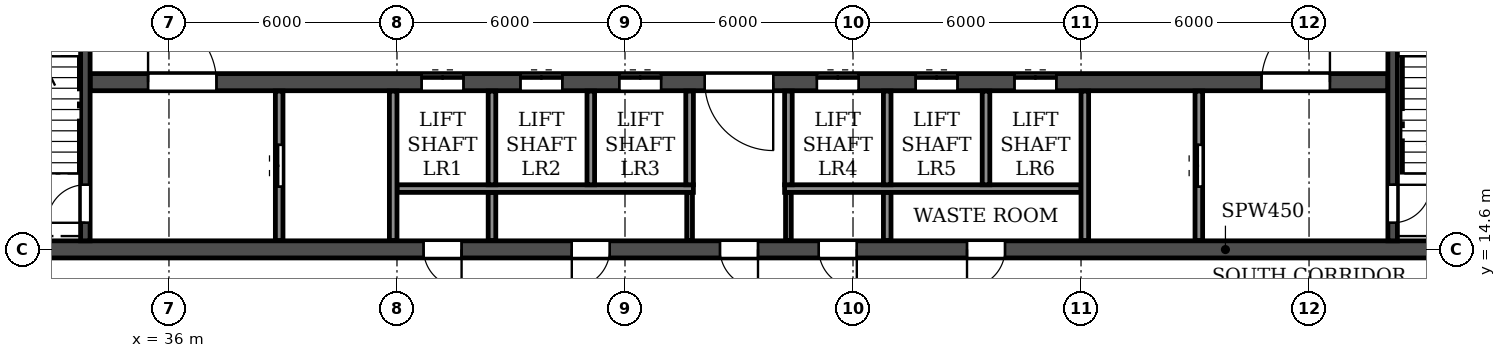
"""IFC4 building model, lengths in metres.
Left out: names, types, materials, properties, quantities, classifications, styles, units other than length and angle.
Written with IfcOpenShell. Run it as: python <this file> out.ifc"""

import sys

from ifc_helpers import new_model, si_unit, direction, frame, frame_2d, origin, place, context, subcontext, project, spatial, rectangle, extrude, element, fill, save


model = new_model("IFC4")
c1 = context("Model", 3, precision=1e-05, world=origin(), true_north=direction((0.0, 1.0)))
c2 = subcontext(c1, "Body", "Model", "MODEL_VIEW")
j1 = project(units=[si_unit("LENGTHUNIT", "METRE"), si_unit("PLANEANGLEUNIT", "RADIAN")], contexts=[c1])
p1 = place(None, origin())
s1 = spatial("IfcSite", under=j1, at=p1, CompositionType="ELEMENT")
p2 = place(p1, origin())
s2 = spatial("IfcBuilding", under=s1, at=p2, CompositionType="ELEMENT")
p3 = place(p2, frame((0.0, 0.0, 10.8)))
s3 = spatial("IfcBuildingStorey", under=s2, at=p3, CompositionType="ELEMENT", Elevation=10.8)
p4 = place(p3, frame((18.0, 14.6, 0.0), z_axis=(0.0, 0.0, 1.0), x_axis=(1.0, 0.0, 0.0)))
e1 = element("IfcWall", 1, at=p4, inside=s3, PredefinedType="SOLIDWALL", context=c2, shape_type="SweptSolid", body=[
    extrude(rectangle(XDim=66.0, YDim=0.45, at=frame_2d((33.0, 0.0))), origin(), (0.0, 0.0, 1.0), 3.92),
])
p5 = place(p4, frame((0.9, 0.0, 0.0)))
e2 = element("IfcOpeningElement", 2, at=p5, cuts=e1, PredefinedType="OPENING", context=c2, shape_type="SweptSolid", body=[
    extrude(rectangle(XDim=1.0, YDim=2.1, at=frame_2d((0.5, 1.05))), frame((0.0, 0.235, 0.0), z_axis=(0.0, -1.0, 0.0), x_axis=(1.0, 0.0, 0.0)), (0.0, 0.0, 1.0), 0.47),
])
p6 = place(p4, frame((8.8, 0.0, 0.0)))
e3 = element("IfcOpeningElement", 3, at=p6, cuts=e1, PredefinedType="OPENING", context=c2, shape_type="SweptSolid", body=[
    extrude(rectangle(XDim=1.0, YDim=2.1, at=frame_2d((0.5, 1.05))), frame((0.0, 0.235, 0.0), z_axis=(0.0, -1.0, 0.0), x_axis=(1.0, 0.0, 0.0)), (0.0, 0.0, 1.0), 0.47),
])
p7 = place(p4, frame((13.4, 0.0, 0.0)))
e4 = element("IfcOpeningElement", 4, at=p7, cuts=e1, PredefinedType="OPENING", context=c2, shape_type="SweptSolid", body=[
    extrude(rectangle(XDim=1.0, YDim=2.1, at=frame_2d((0.5, 1.05))), frame((0.0, 0.235, 0.0), z_axis=(0.0, -1.0, 0.0), x_axis=(1.0, 0.0, 0.0)), (0.0, 0.0, 1.0), 0.47),
])
p8 = place(p4, frame((24.7, 0.0, 0.0)))
e5 = element("IfcOpeningElement", 5, at=p8, cuts=e1, PredefinedType="OPENING", context=c2, shape_type="SweptSolid", body=[
    extrude(rectangle(XDim=1.0, YDim=2.1, at=frame_2d((0.5, 1.05))), frame((0.0, 0.235, 0.0), z_axis=(0.0, -1.0, 0.0), x_axis=(1.0, 0.0, 0.0)), (0.0, 0.0, 1.0), 0.47),
])
p9 = place(p4, frame((28.6, 0.0, 0.0)))
e6 = element("IfcOpeningElement", 6, at=p9, cuts=e1, PredefinedType="OPENING", context=c2, shape_type="SweptSolid", body=[
    extrude(rectangle(XDim=1.0, YDim=2.1, at=frame_2d((0.5, 1.05))), frame((0.0, 0.235, 0.0), z_axis=(0.0, -1.0, 0.0), x_axis=(1.0, 0.0, 0.0)), (0.0, 0.0, 1.0), 0.47),
])
p10 = place(p4, frame((32.5, 0.0, 0.0)))
e7 = element("IfcOpeningElement", 7, at=p10, cuts=e1, PredefinedType="OPENING", context=c2, shape_type="SweptSolid", body=[
    extrude(rectangle(XDim=1.0, YDim=2.1, at=frame_2d((0.5, 1.05))), frame((0.0, 0.235, 0.0), z_axis=(0.0, -1.0, 0.0), x_axis=(1.0, 0.0, 0.0)), (0.0, 0.0, 1.0), 0.47),
])
p11 = place(p4, frame((35.1, 0.0, 0.0)))
e8 = element("IfcOpeningElement", 8, at=p11, cuts=e1, PredefinedType="OPENING", context=c2, shape_type="SweptSolid", body=[
    extrude(rectangle(XDim=1.0, YDim=2.1, at=frame_2d((0.5, 1.05))), frame((0.0, 0.235, 0.0), z_axis=(0.0, -1.0, 0.0), x_axis=(1.0, 0.0, 0.0)), (0.0, 0.0, 1.0), 0.47),
])
p12 = place(p4, frame((39.0, 0.0, 0.0)))
e9 = element("IfcOpeningElement", 9, at=p12, cuts=e1, PredefinedType="OPENING", context=c2, shape_type="SweptSolid", body=[
    extrude(rectangle(XDim=1.0, YDim=2.1, at=frame_2d((0.5, 1.05))), frame((0.0, 0.235, 0.0), z_axis=(0.0, -1.0, 0.0), x_axis=(1.0, 0.0, 0.0)), (0.0, 0.0, 1.0), 0.47),
])
p13 = place(p4, frame((51.6, 0.0, 0.0)))
e10 = element("IfcOpeningElement", 10, at=p13, cuts=e1, PredefinedType="OPENING", context=c2, shape_type="SweptSolid", body=[
    extrude(rectangle(XDim=1.0, YDim=2.1, at=frame_2d((0.5, 1.05))), frame((0.0, 0.235, 0.0), z_axis=(0.0, -1.0, 0.0), x_axis=(1.0, 0.0, 0.0)), (0.0, 0.0, 1.0), 0.47),
])
p14 = place(p4, frame((56.25, 0.0, 0.0)))
e11 = element("IfcOpeningElement", 11, at=p14, cuts=e1, PredefinedType="OPENING", context=c2, shape_type="SweptSolid", body=[
    extrude(rectangle(XDim=0.9, YDim=2.1, at=frame_2d((0.45, 1.05))), frame((0.0, 0.235, 0.0), z_axis=(0.0, -1.0, 0.0), x_axis=(1.0, 0.0, 0.0)), (0.0, 0.0, 1.0), 0.47),
])
p15 = place(p4, frame((64.1, 0.0, 0.0)))
e12 = element("IfcOpeningElement", 12, at=p15, cuts=e1, PredefinedType="OPENING", context=c2, shape_type="SweptSolid", body=[
    extrude(rectangle(XDim=1.0, YDim=2.1, at=frame_2d((0.5, 1.05))), frame((0.0, 0.235, 0.0), z_axis=(0.0, -1.0, 0.0), x_axis=(1.0, 0.0, 0.0)), (0.0, 0.0, 1.0), 0.47),
])
p16 = place(p3, frame((33.925, 19.0, 0.0), z_axis=(0.0, 0.0, 1.0), x_axis=(1.0, 0.0, 0.0)))
e13 = element("IfcWall", 13, at=p16, inside=s3, PredefinedType="SOLIDWALL", context=c2, shape_type="SweptSolid", body=[
    extrude(rectangle(XDim=34.15, YDim=0.45, at=frame_2d((17.075, 0.0))), origin(), (0.0, 0.0, 1.0), 3.92),
])
p17 = place(p16, frame((16.175, 0.0, 0.0)))
e14 = element("IfcOpeningElement", 14, at=p17, cuts=e13, PredefinedType="OPENING", context=c2, shape_type="SweptSolid", body=[
    extrude(rectangle(XDim=1.8, YDim=2.1, at=frame_2d((0.9, 1.05))), frame((0.0, 0.235, 0.0), z_axis=(0.0, -1.0, 0.0), x_axis=(1.0, 0.0, 0.0)), (0.0, 0.0, 1.0), 0.47),
])
p18 = place(p16, frame((1.525, 0.0, 0.0)))
e15 = element("IfcOpeningElement", 15, at=p18, cuts=e13, PredefinedType="OPENING", context=c2, shape_type="SweptSolid", body=[
    extrude(rectangle(XDim=1.8, YDim=2.1, at=frame_2d((0.9, 1.05))), frame((0.0, 0.235, 0.0), z_axis=(0.0, -1.0, 0.0), x_axis=(1.0, 0.0, 0.0)), (0.0, 0.0, 1.0), 0.47),
])
p19 = place(p16, frame((8.725, 0.0, 0.0)))
e16 = element("IfcOpeningElement", 16, at=p19, cuts=e13, PredefinedType="OPENING", context=c2, shape_type="SweptSolid", body=[
    extrude(rectangle(XDim=1.1, YDim=2.1, at=frame_2d((0.55, 1.05))), frame((0.0, 0.235, 0.0), z_axis=(0.0, -1.0, 0.0), x_axis=(1.0, 0.0, 0.0)), (0.0, 0.0, 1.0), 0.47),
])
p20 = place(p16, frame((11.325, 0.0, 0.0)))
e17 = element("IfcOpeningElement", 17, at=p20, cuts=e13, PredefinedType="OPENING", context=c2, shape_type="SweptSolid", body=[
    extrude(rectangle(XDim=1.1, YDim=2.1, at=frame_2d((0.55, 1.05))), frame((0.0, 0.235, 0.0), z_axis=(0.0, -1.0, 0.0), x_axis=(1.0, 0.0, 0.0)), (0.0, 0.0, 1.0), 0.47),
])
p21 = place(p16, frame((13.925, 0.0, 0.0)))
e18 = element("IfcOpeningElement", 18, at=p21, cuts=e13, PredefinedType="OPENING", context=c2, shape_type="SweptSolid", body=[
    extrude(rectangle(XDim=1.1, YDim=2.1, at=frame_2d((0.55, 1.05))), frame((0.0, 0.235, 0.0), z_axis=(0.0, -1.0, 0.0), x_axis=(1.0, 0.0, 0.0)), (0.0, 0.0, 1.0), 0.47),
])
p22 = place(p16, frame((19.125, 0.0, 0.0)))
e19 = element("IfcOpeningElement", 19, at=p22, cuts=e13, PredefinedType="OPENING", context=c2, shape_type="SweptSolid", body=[
    extrude(rectangle(XDim=1.1, YDim=2.1, at=frame_2d((0.55, 1.05))), frame((0.0, 0.235, 0.0), z_axis=(0.0, -1.0, 0.0), x_axis=(1.0, 0.0, 0.0)), (0.0, 0.0, 1.0), 0.47),
])
p23 = place(p16, frame((21.725, 0.0, 0.0)))
e20 = element("IfcOpeningElement", 20, at=p23, cuts=e13, PredefinedType="OPENING", context=c2, shape_type="SweptSolid", body=[
    extrude(rectangle(XDim=1.1, YDim=2.1, at=frame_2d((0.55, 1.05))), frame((0.0, 0.235, 0.0), z_axis=(0.0, -1.0, 0.0), x_axis=(1.0, 0.0, 0.0)), (0.0, 0.0, 1.0), 0.47),
])
p24 = place(p16, frame((24.325, 0.0, 0.0)))
e21 = element("IfcOpeningElement", 21, at=p24, cuts=e13, PredefinedType="OPENING", context=c2, shape_type="SweptSolid", body=[
    extrude(rectangle(XDim=1.1, YDim=2.1, at=frame_2d((0.55, 1.05))), frame((0.0, 0.235, 0.0), z_axis=(0.0, -1.0, 0.0), x_axis=(1.0, 0.0, 0.0)), (0.0, 0.0, 1.0), 0.47),
])
p25 = place(p16, frame((30.825, 0.0, 0.0)))
e22 = element("IfcOpeningElement", 22, at=p25, cuts=e13, PredefinedType="OPENING", context=c2, shape_type="SweptSolid", body=[
    extrude(rectangle(XDim=1.8, YDim=2.1, at=frame_2d((0.9, 1.05))), frame((0.0, 0.235, 0.0), z_axis=(0.0, -1.0, 0.0), x_axis=(1.0, 0.0, 0.0)), (0.0, 0.0, 1.0), 0.47),
])
p26 = place(p3, frame((33.8, 14.825, 0.0), z_axis=(0.0, 0.0, 1.0), x_axis=(0.0, 1.0, 0.0)))
e23 = element("IfcWall", 23, at=p26, inside=s3, PredefinedType="SOLIDWALL", context=c2, shape_type="SweptSolid", body=[
    extrude(rectangle(XDim=7.65, YDim=0.25, at=frame_2d((3.825, 0.0))), origin(), (0.0, 0.0, 1.0), 3.92),
])
p27 = place(p26, frame((0.475, 0.0, 0.0)))
e24 = element("IfcOpeningElement", 24, at=p27, cuts=e23, PredefinedType="OPENING", context=c2, shape_type="SweptSolid", body=[
    extrude(rectangle(XDim=1.0, YDim=2.1, at=frame_2d((0.5, 1.05))), frame((0.0, 0.135, 0.0), z_axis=(0.0, -1.0, 0.0), x_axis=(1.0, 0.0, 0.0)), (0.0, 0.0, 1.0), 0.27),
])
p28 = place(p3, frame((68.2, 14.825, 0.0), z_axis=(0.0, 0.0, 1.0), x_axis=(0.0, 1.0, 0.0)))
e25 = element("IfcWall", 25, at=p28, inside=s3, PredefinedType="SOLIDWALL", context=c2, shape_type="SweptSolid", body=[
    extrude(rectangle(XDim=7.65, YDim=0.25, at=frame_2d((3.825, 0.0))), origin(), (0.0, 0.0, 1.0), 3.92),
])
p29 = place(p28, frame((0.475, 0.0, 0.0)))
e26 = element("IfcOpeningElement", 26, at=p29, cuts=e25, PredefinedType="OPENING", context=c2, shape_type="SweptSolid", body=[
    extrude(rectangle(XDim=1.0, YDim=2.1, at=frame_2d((0.5, 1.05))), frame((0.0, 0.135, 0.0), z_axis=(0.0, -1.0, 0.0), x_axis=(1.0, 0.0, 0.0)), (0.0, 0.0, 1.0), 0.27),
])
for number, where, z_axis, x_axis in (
    (27, (49.7, 14.835, 0.0), (0.0, 0.0, 1.0), (0.0, 1.0, 0.0)),
    (28, (52.3, 14.835, 0.0), (0.0, 0.0, 1.0), (0.0, 1.0, 0.0)),
):
    element("IfcWall", number, at=place(p3, frame(where, z_axis=z_axis, x_axis=x_axis)), inside=s3, PredefinedType="PARTITIONING", context=c2, shape_type="SweptSolid", body=[
        extrude(rectangle(XDim=1.265, YDim=0.15, at=frame_2d((0.633, 0.0))), origin(), (0.0, 0.0, 1.0), 3.92),
    ])
for number, where, z_axis, x_axis in (
    (29, (44.5, 14.835, 0.0), (0.0, 0.0, 1.0), (0.0, 1.0, 0.0)),
    (30, (54.9, 14.835, 0.0), (0.0, 0.0, 1.0), (0.0, 1.0, 0.0)),
):
    element("IfcWall", number, at=place(p3, frame(where, z_axis=z_axis, x_axis=x_axis)), inside=s3, PredefinedType="PARTITIONING", context=c2, shape_type="SweptSolid", body=[
        extrude(rectangle(XDim=1.265, YDim=0.2, at=frame_2d((0.633, 0.0))), origin(), (0.0, 0.0, 1.0), 3.92),
    ])
for number, where, z_axis, x_axis in (
    (31, (42.0, 16.2, 0.0), (0.0, 0.0, 1.0), (1.0, 0.0, 0.0)),
    (32, (52.2, 16.2, 0.0), (0.0, 0.0, 1.0), (1.0, 0.0, 0.0)),
):
    element("IfcWall", number, at=place(p3, frame(where, z_axis=z_axis, x_axis=x_axis)), inside=s3, PredefinedType="PARTITIONING", context=c2, shape_type="SweptSolid", body=[
        extrude(rectangle(XDim=7.8, YDim=0.2, at=frame_2d((3.9, 0.0))), origin(), (0.0, 0.0, 1.0), 3.92),
    ])
p30 = place(p3, frame((38.9, 14.835, 0.0), z_axis=(0.0, 0.0, 1.0), x_axis=(0.0, 1.0, 0.0)))
e33 = element("IfcWall", 33, at=p30, inside=s3, PredefinedType="PARTITIONING", context=c2, shape_type="SweptSolid", body=[
    extrude(rectangle(XDim=3.93, YDim=0.2, at=frame_2d((1.965, 0.0))), origin(), (0.0, 0.0, 1.0), 3.92),
])
p31 = place(p30, frame((1.415, 0.0, 0.0)))
e34 = element("IfcOpeningElement", 34, at=p31, cuts=e33, PredefinedType="OPENING", context=c2, shape_type="SweptSolid", body=[
    extrude(rectangle(XDim=1.1, YDim=2.1, at=frame_2d((0.55, 1.05))), frame((0.0, 0.11, 0.0), z_axis=(0.0, -1.0, 0.0), x_axis=(1.0, 0.0, 0.0)), (0.0, 0.0, 1.0), 0.22),
])
p32 = place(p3, frame((41.9, 14.835, 0.0), z_axis=(0.0, 0.0, 1.0), x_axis=(0.0, 1.0, 0.0)))
e35 = element("IfcWall", 35, at=p32, inside=s3, PredefinedType="PARTITIONING", context=c2, shape_type="SweptSolid", body=[
    extrude(rectangle(XDim=3.93, YDim=0.2, at=frame_2d((1.965, 0.0))), origin(), (0.0, 0.0, 1.0), 3.92),
])
for number, where, z_axis, x_axis in (
    (36, (44.5, 16.3, 0.0), (0.0, 0.0, 1.0), (0.0, 1.0, 0.0)),
    (37, (47.1, 16.3, 0.0), (0.0, 0.0, 1.0), (0.0, 1.0, 0.0)),
    (38, (49.7, 16.3, 0.0), (0.0, 0.0, 1.0), (0.0, 1.0, 0.0)),
    (39, (52.3, 16.3, 0.0), (0.0, 0.0, 1.0), (0.0, 1.0, 0.0)),
    (40, (54.9, 16.3, 0.0), (0.0, 0.0, 1.0), (0.0, 1.0, 0.0)),
    (41, (57.5, 16.3, 0.0), (0.0, 0.0, 1.0), (0.0, 1.0, 0.0)),
):
    element("IfcWall", number, at=place(p3, frame(where, z_axis=z_axis, x_axis=x_axis)), inside=s3, PredefinedType="PARTITIONING", context=c2, shape_type="SweptSolid", body=[
        extrude(rectangle(XDim=2.465, YDim=0.2, at=frame_2d((1.232, 0.0))), origin(), (0.0, 0.0, 1.0), 3.92),
    ])
p33 = place(p3, frame((60.1, 14.835, 0.0), z_axis=(0.0, 0.0, 1.0), x_axis=(0.0, 1.0, 0.0)))
e42 = element("IfcWall", 42, at=p33, inside=s3, PredefinedType="PARTITIONING", context=c2, shape_type="SweptSolid", body=[
    extrude(rectangle(XDim=3.93, YDim=0.2, at=frame_2d((1.965, 0.0))), origin(), (0.0, 0.0, 1.0), 3.92),
])
p34 = place(p3, frame((63.1, 14.835, 0.0), z_axis=(0.0, 0.0, 1.0), x_axis=(0.0, 1.0, 0.0)))
e43 = element("IfcWall", 43, at=p34, inside=s3, PredefinedType="PARTITIONING", context=c2, shape_type="SweptSolid", body=[
    extrude(rectangle(XDim=3.93, YDim=0.2, at=frame_2d((1.965, 0.0))), origin(), (0.0, 0.0, 1.0), 3.92),
])
p35 = place(p34, frame((1.415, 0.0, 0.0)))
e44 = element("IfcOpeningElement", 44, at=p35, cuts=e43, PredefinedType="OPENING", context=c2, shape_type="SweptSolid", body=[
    extrude(rectangle(XDim=1.1, YDim=2.1, at=frame_2d((0.55, 1.05))), frame((0.0, 0.11, 0.0), z_axis=(0.0, -1.0, 0.0), x_axis=(1.0, 0.0, 0.0)), (0.0, 0.0, 1.0), 0.22),
])
p36 = place(p8, frame((1.0, 0.0, 0.0), z_axis=(0.0, 0.0, 1.0), x_axis=(-1.0, 0.0, 0.0)))
e45 = element("IfcDoor", 45, at=p36, inside=s3, OperationType="SINGLE_SWING_LEFT", PredefinedType="DOOR", context=c2, shape_type="SweptSolid", body=[
    extrude(rectangle(XDim=1.0, YDim=2.1, at=frame_2d((0.5, 1.05))), frame((0.0, 0.025, 0.0), z_axis=(0.0, -1.0, 0.0), x_axis=(1.0, 0.0, 0.0)), (0.0, 0.0, 1.0), 0.05),
])
fill(e5, e45)
p37 = place(p9, frame((1.0, 0.0, 0.0), z_axis=(0.0, 0.0, 1.0), x_axis=(-1.0, 0.0, 0.0)))
e46 = element("IfcDoor", 46, at=p37, inside=s3, OperationType="SINGLE_SWING_RIGHT", PredefinedType="DOOR", context=c2, shape_type="SweptSolid", body=[
    extrude(rectangle(XDim=1.0, YDim=2.1, at=frame_2d((0.5, 1.05))), frame((0.0, 0.025, 0.0), z_axis=(0.0, -1.0, 0.0), x_axis=(1.0, 0.0, 0.0)), (0.0, 0.0, 1.0), 0.05),
])
fill(e6, e46)
p38 = place(p10, frame((1.0, 0.0, 0.0), z_axis=(0.0, 0.0, 1.0), x_axis=(-1.0, 0.0, 0.0)))
e47 = element("IfcDoor", 47, at=p38, inside=s3, OperationType="SINGLE_SWING_LEFT", PredefinedType="DOOR", context=c2, shape_type="SweptSolid", body=[
    extrude(rectangle(XDim=1.0, YDim=2.1, at=frame_2d((0.5, 1.05))), frame((0.0, 0.025, 0.0), z_axis=(0.0, -1.0, 0.0), x_axis=(1.0, 0.0, 0.0)), (0.0, 0.0, 1.0), 0.05),
])
fill(e7, e47)
p39 = place(p11, frame((1.0, 0.0, 0.0), z_axis=(0.0, 0.0, 1.0), x_axis=(-1.0, 0.0, 0.0)))
e48 = element("IfcDoor", 48, at=p39, inside=s3, OperationType="SINGLE_SWING_LEFT", PredefinedType="DOOR", context=c2, shape_type="SweptSolid", body=[
    extrude(rectangle(XDim=1.0, YDim=2.1, at=frame_2d((0.5, 1.05))), frame((0.0, 0.025, 0.0), z_axis=(0.0, -1.0, 0.0), x_axis=(1.0, 0.0, 0.0)), (0.0, 0.0, 1.0), 0.05),
])
fill(e8, e48)
p40 = place(p12, frame((1.0, 0.0, 0.0), z_axis=(0.0, 0.0, 1.0), x_axis=(-1.0, 0.0, 0.0)))
e49 = element("IfcDoor", 49, at=p40, inside=s3, OperationType="SINGLE_SWING_RIGHT", PredefinedType="DOOR", context=c2, shape_type="SweptSolid", body=[
    extrude(rectangle(XDim=1.0, YDim=2.1, at=frame_2d((0.5, 1.05))), frame((0.0, 0.025, 0.0), z_axis=(0.0, -1.0, 0.0), x_axis=(1.0, 0.0, 0.0)), (0.0, 0.0, 1.0), 0.05),
])
fill(e9, e49)
p41 = place(p35, origin())
e50 = element("IfcDoor", 50, at=p41, inside=s3, OperationType="DOUBLE_DOOR_SLIDING", PredefinedType="DOOR", context=c2, shape_type="SweptSolid", body=[
    extrude(rectangle(XDim=1.1, YDim=2.1, at=frame_2d((0.55, 1.05))), frame((0.0, 0.025, 0.0), z_axis=(0.0, -1.0, 0.0), x_axis=(1.0, 0.0, 0.0)), (0.0, 0.0, 1.0), 0.05),
])
fill(e44, e50)
p42 = place(p29, frame((1.0, 0.0, 0.0), z_axis=(0.0, 0.0, 1.0), x_axis=(-1.0, 0.0, 0.0)))
e51 = element("IfcDoor", 51, at=p42, inside=s3, OperationType="SINGLE_SWING_LEFT", PredefinedType="DOOR", context=c2, shape_type="SweptSolid", body=[
    extrude(rectangle(XDim=1.0, YDim=2.1, at=frame_2d((0.5, 1.05))), frame((0.0, 0.025, 0.0), z_axis=(0.0, -1.0, 0.0), x_axis=(1.0, 0.0, 0.0)), (0.0, 0.0, 1.0), 0.05),
])
fill(e26, e51)
p43 = place(p27, origin())
e52 = element("IfcDoor", 52, at=p43, inside=s3, OperationType="SINGLE_SWING_LEFT", PredefinedType="DOOR", context=c2, shape_type="SweptSolid", body=[
    extrude(rectangle(XDim=1.0, YDim=2.1, at=frame_2d((0.5, 1.05))), frame((0.0, 0.025, 0.0), z_axis=(0.0, -1.0, 0.0), x_axis=(1.0, 0.0, 0.0)), (0.0, 0.0, 1.0), 0.05),
])
fill(e24, e52)
p44 = place(p31, origin())
e53 = element("IfcDoor", 53, at=p44, inside=s3, OperationType="DOUBLE_DOOR_SLIDING", PredefinedType="DOOR", context=c2, shape_type="SweptSolid", body=[
    extrude(rectangle(XDim=1.1, YDim=2.1, at=frame_2d((0.55, 1.05))), frame((0.0, 0.025, 0.0), z_axis=(0.0, -1.0, 0.0), x_axis=(1.0, 0.0, 0.0)), (0.0, 0.0, 1.0), 0.05),
])
fill(e34, e53)
p45 = place(p17, frame((1.8, 0.0, 0.0), z_axis=(0.0, 0.0, 1.0), x_axis=(-1.0, 0.0, 0.0)))
e54 = element("IfcDoor", 54, at=p45, inside=s3, OperationType="DOUBLE_DOOR_SINGLE_SWING", PredefinedType="DOOR", context=c2, shape_type="SweptSolid", body=[
    extrude(rectangle(XDim=1.8, YDim=2.1, at=frame_2d((0.9, 1.05))), frame((0.0, 0.025, 0.0), z_axis=(0.0, -1.0, 0.0), x_axis=(1.0, 0.0, 0.0)), (0.0, 0.0, 1.0), 0.05),
])
fill(e14, e54)
p46 = place(p18, origin())
e55 = element("IfcDoor", 55, at=p46, inside=s3, OperationType="DOUBLE_DOOR_SINGLE_SWING", PredefinedType="DOOR", context=c2, shape_type="SweptSolid", body=[
    extrude(rectangle(XDim=1.8, YDim=2.1, at=frame_2d((0.9, 1.05))), frame((0.0, 0.025, 0.0), z_axis=(0.0, -1.0, 0.0), x_axis=(1.0, 0.0, 0.0)), (0.0, 0.0, 1.0), 0.05),
])
fill(e15, e55)
p47 = place(p19, origin())
e56 = element("IfcDoor", 56, at=p47, inside=s3, OperationType="DOUBLE_DOOR_SLIDING", PredefinedType="DOOR", context=c2, shape_type="SweptSolid", body=[
    extrude(rectangle(XDim=1.1, YDim=2.1, at=frame_2d((0.55, 1.05))), frame((0.0, 0.025, 0.0), z_axis=(0.0, -1.0, 0.0), x_axis=(1.0, 0.0, 0.0)), (0.0, 0.0, 1.0), 0.05),
])
fill(e16, e56)
p48 = place(p20, origin())
e57 = element("IfcDoor", 57, at=p48, inside=s3, OperationType="DOUBLE_DOOR_SLIDING", PredefinedType="DOOR", context=c2, shape_type="SweptSolid", body=[
    extrude(rectangle(XDim=1.1, YDim=2.1, at=frame_2d((0.55, 1.05))), frame((0.0, 0.025, 0.0), z_axis=(0.0, -1.0, 0.0), x_axis=(1.0, 0.0, 0.0)), (0.0, 0.0, 1.0), 0.05),
])
fill(e17, e57)
p49 = place(p21, origin())
e58 = element("IfcDoor", 58, at=p49, inside=s3, OperationType="DOUBLE_DOOR_SLIDING", PredefinedType="DOOR", context=c2, shape_type="SweptSolid", body=[
    extrude(rectangle(XDim=1.1, YDim=2.1, at=frame_2d((0.55, 1.05))), frame((0.0, 0.025, 0.0), z_axis=(0.0, -1.0, 0.0), x_axis=(1.0, 0.0, 0.0)), (0.0, 0.0, 1.0), 0.05),
])
fill(e18, e58)
p50 = place(p22, origin())
e59 = element("IfcDoor", 59, at=p50, inside=s3, OperationType="DOUBLE_DOOR_SLIDING", PredefinedType="DOOR", context=c2, shape_type="SweptSolid", body=[
    extrude(rectangle(XDim=1.1, YDim=2.1, at=frame_2d((0.55, 1.05))), frame((0.0, 0.025, 0.0), z_axis=(0.0, -1.0, 0.0), x_axis=(1.0, 0.0, 0.0)), (0.0, 0.0, 1.0), 0.05),
])
fill(e19, e59)
p51 = place(p23, origin())
e60 = element("IfcDoor", 60, at=p51, inside=s3, OperationType="DOUBLE_DOOR_SLIDING", PredefinedType="DOOR", context=c2, shape_type="SweptSolid", body=[
    extrude(rectangle(XDim=1.1, YDim=2.1, at=frame_2d((0.55, 1.05))), frame((0.0, 0.025, 0.0), z_axis=(0.0, -1.0, 0.0), x_axis=(1.0, 0.0, 0.0)), (0.0, 0.0, 1.0), 0.05),
])
fill(e20, e60)
p52 = place(p24, origin())
e61 = element("IfcDoor", 61, at=p52, inside=s3, OperationType="DOUBLE_DOOR_SLIDING", PredefinedType="DOOR", context=c2, shape_type="SweptSolid", body=[
    extrude(rectangle(XDim=1.1, YDim=2.1, at=frame_2d((0.55, 1.05))), frame((0.0, 0.025, 0.0), z_axis=(0.0, -1.0, 0.0), x_axis=(1.0, 0.0, 0.0)), (0.0, 0.0, 1.0), 0.05),
])
fill(e21, e61)
p53 = place(p25, origin())
e62 = element("IfcDoor", 62, at=p53, inside=s3, OperationType="DOUBLE_DOOR_SINGLE_SWING", PredefinedType="DOOR", context=c2, shape_type="SweptSolid", body=[
    extrude(rectangle(XDim=1.8, YDim=2.1, at=frame_2d((0.9, 1.05))), frame((0.0, 0.025, 0.0), z_axis=(0.0, -1.0, 0.0), x_axis=(1.0, 0.0, 0.0)), (0.0, 0.0, 1.0), 0.05),
])
fill(e22, e62)
save(model, sys.argv[1])
